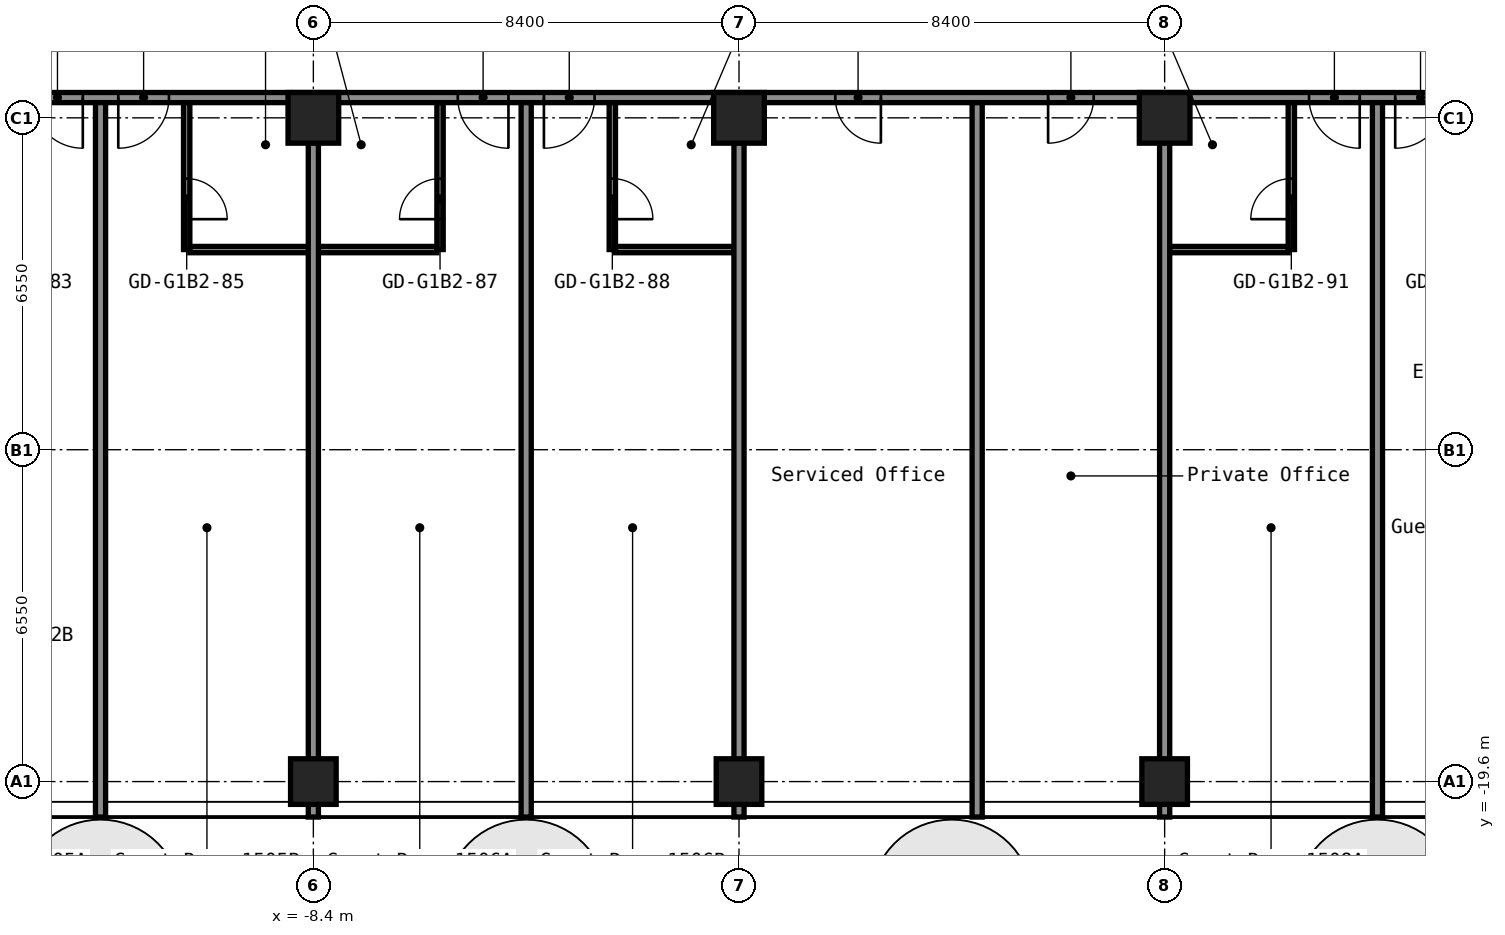
"""IFC4 building model, lengths in metres.
Left out: names, types, materials, properties, quantities, classifications, styles, units other than length and angle.
Written with IfcOpenShell. Run it as: python <this file> out.ifc"""

import sys

from ifc_helpers import new_model, si_unit, direction, frame, frame_2d, origin, origin_2d, place, context, subcontext, project, spatial, rectangle, hollow_rectangle, extrude, element, fill, save


model = new_model("IFC4")
c1 = context("Model", 3, precision=1e-05, world=origin(), true_north=direction((0.0, 1.0)))
c2 = subcontext(c1, "Body", "Model", "MODEL_VIEW")
j1 = project(units=[si_unit("LENGTHUNIT", "METRE"), si_unit("PLANEANGLEUNIT", "RADIAN")], contexts=[c1])
p1 = place(None, origin())
s1 = spatial("IfcSite", under=j1, at=p1, CompositionType="ELEMENT")
p2 = place(p1, origin())
s2 = spatial("IfcBuilding", under=s1, at=p2, CompositionType="ELEMENT")
p3 = place(p2, frame((0.0, 0.0, 55.0)))
s3 = spatial("IfcBuildingStorey", under=s2, at=p3, CompositionType="ELEMENT", Elevation=55.0)
p4 = place(p3, frame((-8.4, -19.6, 0.0), z_axis=(0.0, 0.0, 1.0), x_axis=(1.0, 0.0, 0.0)))
e1 = element("IfcColumn", 1, at=p4, inside=s3, PredefinedType="COLUMN", context=c2, shape_type="SweptSolid", body=[
    extrude(hollow_rectangle(XDim=0.9, YDim=0.9, WallThickness=0.036, at=origin_2d()), origin(), (0.0, 0.0, 1.0), 2.8),
])
p5 = place(p3, frame((-8.4, -6.5, 0.0), z_axis=(0.0, 0.0, 1.0), x_axis=(1.0, 0.0, 0.0)))
e2 = element("IfcColumn", 2, at=p5, inside=s3, PredefinedType="COLUMN", context=c2, shape_type="SweptSolid", body=[
    extrude(hollow_rectangle(XDim=1.0, YDim=1.0, WallThickness=0.04, at=origin_2d()), origin(), (0.0, 0.0, 1.0), 2.8),
])
p6 = place(p3, frame((0.0, -19.6, 0.0), z_axis=(0.0, 0.0, 1.0), x_axis=(1.0, 0.0, 0.0)))
e3 = element("IfcColumn", 3, at=p6, inside=s3, PredefinedType="COLUMN", context=c2, shape_type="SweptSolid", body=[
    extrude(hollow_rectangle(XDim=0.9, YDim=0.9, WallThickness=0.036, at=origin_2d()), origin(), (0.0, 0.0, 1.0), 2.8),
])
p7 = place(p3, frame((0.0, -6.5, 0.0), z_axis=(0.0, 0.0, 1.0), x_axis=(1.0, 0.0, 0.0)))
e4 = element("IfcColumn", 4, at=p7, inside=s3, PredefinedType="COLUMN", context=c2, shape_type="SweptSolid", body=[
    extrude(hollow_rectangle(XDim=1.0, YDim=1.0, WallThickness=0.04, at=origin_2d()), origin(), (0.0, 0.0, 1.0), 2.8),
])
p8 = place(p3, frame((8.4, -19.6, 0.0), z_axis=(0.0, 0.0, 1.0), x_axis=(1.0, 0.0, 0.0)))
e5 = element("IfcColumn", 5, at=p8, inside=s3, PredefinedType="COLUMN", context=c2, shape_type="SweptSolid", body=[
    extrude(hollow_rectangle(XDim=0.9, YDim=0.9, WallThickness=0.036, at=origin_2d()), origin(), (0.0, 0.0, 1.0), 2.8),
])
p9 = place(p3, frame((8.4, -6.5, 0.0), z_axis=(0.0, 0.0, 1.0), x_axis=(1.0, 0.0, 0.0)))
e6 = element("IfcColumn", 6, at=p9, inside=s3, PredefinedType="COLUMN", context=c2, shape_type="SweptSolid", body=[
    extrude(hollow_rectangle(XDim=1.0, YDim=1.0, WallThickness=0.04, at=origin_2d()), origin(), (0.0, 0.0, 1.0), 2.8),
])
p10 = place(p3, frame((-10.837, -9.1, 0.0), z_axis=(0.0, 0.0, 1.0), x_axis=(1.0, 0.0, 0.0)))
e7 = element("IfcWall", 7, at=p10, inside=s3, PredefinedType="PARTITIONING", context=c2, shape_type="SweptSolid", body=[
    extrude(rectangle(XDim=4.875, YDim=0.125, at=frame_2d((2.438, 0.0))), origin(), (0.0, 0.0, 1.0), 2.8),
])
for number, where, z_axis, x_axis in (
    (8, (-2.438, -9.1, 0.0), (0.0, 0.0, 1.0), (1.0, 0.0, 0.0)),
    (9, (8.5, -9.1, 0.0), (0.0, 0.0, 1.0), (1.0, 0.0, 0.0)),
):
    element("IfcWall", number, at=place(p3, frame(where, z_axis=z_axis, x_axis=x_axis)), inside=s3, PredefinedType="PARTITIONING", context=c2, shape_type="SweptSolid", body=[
        extrude(rectangle(XDim=2.337, YDim=0.125, at=frame_2d((1.169, 0.0))), origin(), (0.0, 0.0, 1.0), 2.8),
    ])
p11 = place(p3, frame((-16.8, -6.1, 0.0), z_axis=(0.0, 0.0, 1.0), x_axis=(1.0, 0.0, 0.0)))
e10 = element("IfcWall", 10, at=p11, inside=s3, PredefinedType="PARTITIONING", context=c2, shape_type="SweptSolid", body=[
    extrude(rectangle(XDim=33.6, YDim=0.2, at=frame_2d((16.8, 0.0))), origin(), (0.0, 0.0, 1.0), 2.8),
])
p12 = place(p11, frame((2.85, 0.0, 0.0)))
e11 = element("IfcOpeningElement", 11, at=p12, cuts=e10, PredefinedType="OPENING", context=c2, shape_type="SweptSolid", body=[
    extrude(rectangle(XDim=1.0, YDim=2.1, at=frame_2d((0.5, 1.05))), frame((0.0, 0.11, 0.0), z_axis=(0.0, -1.0, 0.0), x_axis=(1.0, 0.0, 0.0)), (0.0, 0.0, 1.0), 0.22),
])
p13 = place(p11, frame((4.55, 0.0, 0.0)))
e12 = element("IfcOpeningElement", 12, at=p13, cuts=e10, PredefinedType="OPENING", context=c2, shape_type="SweptSolid", body=[
    extrude(rectangle(XDim=1.0, YDim=2.1, at=frame_2d((0.5, 1.05))), frame((0.0, 0.11, 0.0), z_axis=(0.0, -1.0, 0.0), x_axis=(1.0, 0.0, 0.0)), (0.0, 0.0, 1.0), 0.22),
])
p14 = place(p11, frame((11.25, 0.0, 0.0)))
e13 = element("IfcOpeningElement", 13, at=p14, cuts=e10, PredefinedType="OPENING", context=c2, shape_type="SweptSolid", body=[
    extrude(rectangle(XDim=1.0, YDim=2.1, at=frame_2d((0.5, 1.05))), frame((0.0, 0.11, 0.0), z_axis=(0.0, -1.0, 0.0), x_axis=(1.0, 0.0, 0.0)), (0.0, 0.0, 1.0), 0.22),
])
p15 = place(p11, frame((12.95, 0.0, 0.0)))
e14 = element("IfcOpeningElement", 14, at=p15, cuts=e10, PredefinedType="OPENING", context=c2, shape_type="SweptSolid", body=[
    extrude(rectangle(XDim=1.0, YDim=2.1, at=frame_2d((0.5, 1.05))), frame((0.0, 0.11, 0.0), z_axis=(0.0, -1.0, 0.0), x_axis=(1.0, 0.0, 0.0)), (0.0, 0.0, 1.0), 0.22),
])
p16 = place(p11, frame((18.7, 0.0, 0.0)))
e15 = element("IfcOpeningElement", 15, at=p16, cuts=e10, PredefinedType="OPENING", context=c2, shape_type="SweptSolid", body=[
    extrude(rectangle(XDim=0.9, YDim=2.1, at=frame_2d((0.45, 1.05))), frame((0.0, 0.11, 0.0), z_axis=(0.0, -1.0, 0.0), x_axis=(1.0, 0.0, 0.0)), (0.0, 0.0, 1.0), 0.22),
])
p17 = place(p11, frame((22.9, 0.0, 0.0)))
e16 = element("IfcOpeningElement", 16, at=p17, cuts=e10, PredefinedType="OPENING", context=c2, shape_type="SweptSolid", body=[
    extrude(rectangle(XDim=0.9, YDim=2.1, at=frame_2d((0.45, 1.05))), frame((0.0, 0.11, 0.0), z_axis=(0.0, -1.0, 0.0), x_axis=(1.0, 0.0, 0.0)), (0.0, 0.0, 1.0), 0.22),
])
p18 = place(p11, frame((28.05, 0.0, 0.0)))
e17 = element("IfcOpeningElement", 17, at=p18, cuts=e10, PredefinedType="OPENING", context=c2, shape_type="SweptSolid", body=[
    extrude(rectangle(XDim=1.0, YDim=2.1, at=frame_2d((0.5, 1.05))), frame((0.0, 0.11, 0.0), z_axis=(0.0, -1.0, 0.0), x_axis=(1.0, 0.0, 0.0)), (0.0, 0.0, 1.0), 0.22),
])
p19 = place(p11, frame((29.75, 0.0, 0.0)))
e18 = element("IfcOpeningElement", 18, at=p19, cuts=e10, PredefinedType="OPENING", context=c2, shape_type="SweptSolid", body=[
    extrude(rectangle(XDim=1.0, YDim=2.1, at=frame_2d((0.5, 1.05))), frame((0.0, 0.11, 0.0), z_axis=(0.0, -1.0, 0.0), x_axis=(1.0, 0.0, 0.0)), (0.0, 0.0, 1.0), 0.22),
])
p20 = place(p3, frame((-12.6, -20.3, 0.0), z_axis=(0.0, 0.0, 1.0), x_axis=(0.0, 1.0, 0.0)))
e19 = element("IfcWall", 19, at=p20, inside=s3, PredefinedType="PARTITIONING", context=c2, shape_type="SweptSolid", body=[
    extrude(rectangle(XDim=14.1, YDim=0.2, at=frame_2d((7.05, 0.0))), origin(), (0.0, 0.0, 1.0), 2.8),
])
p21 = place(p3, frame((-10.9, -9.1, 0.0), z_axis=(0.0, 0.0, 1.0), x_axis=(0.0, 1.0, 0.0)))
e20 = element("IfcWall", 20, at=p21, inside=s3, PredefinedType="PARTITIONING", context=c2, shape_type="SweptSolid", body=[
    extrude(rectangle(XDim=2.9, YDim=0.125, at=frame_2d((1.45, 0.0))), origin(), (0.0, 0.0, 1.0), 2.8),
])
p22 = place(p21, frame((0.6, 0.0, 0.0)))
e21 = element("IfcOpeningElement", 21, at=p22, cuts=e20, PredefinedType="OPENING", context=c2, shape_type="SweptSolid", body=[
    extrude(rectangle(XDim=0.8, YDim=2.1, at=frame_2d((0.4, 1.05))), frame((0.0, 0.073, 0.0), z_axis=(0.0, -1.0, 0.0), x_axis=(1.0, 0.0, 0.0)), (0.0, 0.0, 1.0), 0.145),
])
p23 = place(p3, frame((-8.4, -20.3, 0.0), z_axis=(0.0, 0.0, 1.0), x_axis=(0.0, 1.0, 0.0)))
e22 = element("IfcWall", 22, at=p23, inside=s3, PredefinedType="PARTITIONING", context=c2, shape_type="SweptSolid", body=[
    extrude(rectangle(XDim=13.31, YDim=0.2, at=frame_2d((6.655, 0.0))), origin(), (0.0, 0.0, 1.0), 2.8),
])
p24 = place(p3, frame((-5.9, -9.1, 0.0), z_axis=(0.0, 0.0, 1.0), x_axis=(0.0, 1.0, 0.0)))
e23 = element("IfcWall", 23, at=p24, inside=s3, PredefinedType="PARTITIONING", context=c2, shape_type="SweptSolid", body=[
    extrude(rectangle(XDim=2.9, YDim=0.125, at=frame_2d((1.45, 0.0))), origin(), (0.0, 0.0, 1.0), 2.8),
])
p25 = place(p24, frame((0.6, 0.0, 0.0)))
e24 = element("IfcOpeningElement", 24, at=p25, cuts=e23, PredefinedType="OPENING", context=c2, shape_type="SweptSolid", body=[
    extrude(rectangle(XDim=0.8, YDim=2.1, at=frame_2d((0.4, 1.05))), frame((0.0, 0.073, 0.0), z_axis=(0.0, -1.0, 0.0), x_axis=(1.0, 0.0, 0.0)), (0.0, 0.0, 1.0), 0.145),
])
p26 = place(p3, frame((-4.2, -20.3, 0.0), z_axis=(0.0, 0.0, 1.0), x_axis=(0.0, 1.0, 0.0)))
e25 = element("IfcWall", 25, at=p26, inside=s3, PredefinedType="PARTITIONING", context=c2, shape_type="SweptSolid", body=[
    extrude(rectangle(XDim=14.1, YDim=0.2, at=frame_2d((7.05, 0.0))), origin(), (0.0, 0.0, 1.0), 2.8),
])
p27 = place(p3, frame((-2.5, -9.1, 0.0), z_axis=(0.0, 0.0, 1.0), x_axis=(0.0, 1.0, 0.0)))
e26 = element("IfcWall", 26, at=p27, inside=s3, PredefinedType="PARTITIONING", context=c2, shape_type="SweptSolid", body=[
    extrude(rectangle(XDim=2.9, YDim=0.125, at=frame_2d((1.45, 0.0))), origin(), (0.0, 0.0, 1.0), 2.8),
])
p28 = place(p27, frame((0.6, 0.0, 0.0)))
e27 = element("IfcOpeningElement", 27, at=p28, cuts=e26, PredefinedType="OPENING", context=c2, shape_type="SweptSolid", body=[
    extrude(rectangle(XDim=0.8, YDim=2.1, at=frame_2d((0.4, 1.05))), frame((0.0, 0.073, 0.0), z_axis=(0.0, -1.0, 0.0), x_axis=(1.0, 0.0, 0.0)), (0.0, 0.0, 1.0), 0.145),
])
p29 = place(p3, frame((0.0, -20.3, 0.0), z_axis=(0.0, 0.0, 1.0), x_axis=(0.0, 1.0, 0.0)))
e28 = element("IfcWall", 28, at=p29, inside=s3, PredefinedType="PARTITIONING", context=c2, shape_type="SweptSolid", body=[
    extrude(rectangle(XDim=13.31, YDim=0.2, at=frame_2d((6.655, 0.0))), origin(), (0.0, 0.0, 1.0), 2.8),
])
p30 = place(p3, frame((4.7, -20.3, 0.0), z_axis=(0.0, 0.0, 1.0), x_axis=(0.0, 1.0, 0.0)))
e29 = element("IfcWall", 29, at=p30, inside=s3, PredefinedType="PARTITIONING", context=c2, shape_type="SweptSolid", body=[
    extrude(rectangle(XDim=14.1, YDim=0.2, at=frame_2d((7.05, 0.0))), origin(), (0.0, 0.0, 1.0), 2.8),
])
p31 = place(p3, frame((8.4, -20.3, 0.0), z_axis=(0.0, 0.0, 1.0), x_axis=(0.0, 1.0, 0.0)))
e30 = element("IfcWall", 30, at=p31, inside=s3, PredefinedType="PARTITIONING", context=c2, shape_type="SweptSolid", body=[
    extrude(rectangle(XDim=13.31, YDim=0.2, at=frame_2d((6.655, 0.0))), origin(), (0.0, 0.0, 1.0), 2.8),
])
p32 = place(p3, frame((10.9, -9.1, 0.0), z_axis=(0.0, 0.0, 1.0), x_axis=(0.0, 1.0, 0.0)))
e31 = element("IfcWall", 31, at=p32, inside=s3, PredefinedType="PARTITIONING", context=c2, shape_type="SweptSolid", body=[
    extrude(rectangle(XDim=2.9, YDim=0.125, at=frame_2d((1.45, 0.0))), origin(), (0.0, 0.0, 1.0), 2.8),
])
p33 = place(p32, frame((0.6, 0.0, 0.0)))
e32 = element("IfcOpeningElement", 32, at=p33, cuts=e31, PredefinedType="OPENING", context=c2, shape_type="SweptSolid", body=[
    extrude(rectangle(XDim=0.8, YDim=2.1, at=frame_2d((0.4, 1.05))), frame((0.0, 0.073, 0.0), z_axis=(0.0, -1.0, 0.0), x_axis=(1.0, 0.0, 0.0)), (0.0, 0.0, 1.0), 0.145),
])
p34 = place(p3, frame((12.6, -20.3, 0.0), z_axis=(0.0, 0.0, 1.0), x_axis=(0.0, 1.0, 0.0)))
e33 = element("IfcWall", 33, at=p34, inside=s3, PredefinedType="PARTITIONING", context=c2, shape_type="SweptSolid", body=[
    extrude(rectangle(XDim=14.1, YDim=0.2, at=frame_2d((7.05, 0.0))), origin(), (0.0, 0.0, 1.0), 2.8),
])
p35 = place(p12, origin())
e34 = element("IfcDoor", 34, at=p35, inside=s3, OperationType="SINGLE_SWING_RIGHT", PredefinedType="DOOR", context=c2, shape_type="SweptSolid", body=[
    extrude(rectangle(XDim=1.0, YDim=2.1, at=frame_2d((0.5, 1.05))), frame((0.0, 0.025, 0.0), z_axis=(0.0, -1.0, 0.0), x_axis=(1.0, 0.0, 0.0)), (0.0, 0.0, 1.0), 0.05),
])
fill(e11, e34)
p36 = place(p13, origin())
e35 = element("IfcDoor", 35, at=p36, inside=s3, OperationType="SINGLE_SWING_LEFT", PredefinedType="DOOR", context=c2, shape_type="SweptSolid", body=[
    extrude(rectangle(XDim=1.0, YDim=2.1, at=frame_2d((0.5, 1.05))), frame((0.0, 0.025, 0.0), z_axis=(0.0, -1.0, 0.0), x_axis=(1.0, 0.0, 0.0)), (0.0, 0.0, 1.0), 0.05),
])
fill(e12, e35)
p37 = place(p14, origin())
e36 = element("IfcDoor", 36, at=p37, inside=s3, OperationType="SINGLE_SWING_RIGHT", PredefinedType="DOOR", context=c2, shape_type="SweptSolid", body=[
    extrude(rectangle(XDim=1.0, YDim=2.1, at=frame_2d((0.5, 1.05))), frame((0.0, 0.025, 0.0), z_axis=(0.0, -1.0, 0.0), x_axis=(1.0, 0.0, 0.0)), (0.0, 0.0, 1.0), 0.05),
])
fill(e13, e36)
p38 = place(p15, origin())
e37 = element("IfcDoor", 37, at=p38, inside=s3, OperationType="SINGLE_SWING_LEFT", PredefinedType="DOOR", context=c2, shape_type="SweptSolid", body=[
    extrude(rectangle(XDim=1.0, YDim=2.1, at=frame_2d((0.5, 1.05))), frame((0.0, 0.025, 0.0), z_axis=(0.0, -1.0, 0.0), x_axis=(1.0, 0.0, 0.0)), (0.0, 0.0, 1.0), 0.05),
])
fill(e14, e37)
p39 = place(p16, origin())
e38 = element("IfcDoor", 38, at=p39, inside=s3, OperationType="SINGLE_SWING_RIGHT", PredefinedType="DOOR", context=c2, shape_type="SweptSolid", body=[
    extrude(rectangle(XDim=0.9, YDim=2.1, at=frame_2d((0.45, 1.05))), frame((0.0, 0.025, 0.0), z_axis=(0.0, -1.0, 0.0), x_axis=(1.0, 0.0, 0.0)), (0.0, 0.0, 1.0), 0.05),
])
fill(e15, e38)
p40 = place(p17, origin())
e39 = element("IfcDoor", 39, at=p40, inside=s3, OperationType="SINGLE_SWING_LEFT", PredefinedType="DOOR", context=c2, shape_type="SweptSolid", body=[
    extrude(rectangle(XDim=0.9, YDim=2.1, at=frame_2d((0.45, 1.05))), frame((0.0, 0.025, 0.0), z_axis=(0.0, -1.0, 0.0), x_axis=(1.0, 0.0, 0.0)), (0.0, 0.0, 1.0), 0.05),
])
fill(e16, e39)
p41 = place(p18, origin())
e40 = element("IfcDoor", 40, at=p41, inside=s3, OperationType="SINGLE_SWING_RIGHT", PredefinedType="DOOR", context=c2, shape_type="SweptSolid", body=[
    extrude(rectangle(XDim=1.0, YDim=2.1, at=frame_2d((0.5, 1.05))), frame((0.0, 0.025, 0.0), z_axis=(0.0, -1.0, 0.0), x_axis=(1.0, 0.0, 0.0)), (0.0, 0.0, 1.0), 0.05),
])
fill(e17, e40)
p42 = place(p19, origin())
e41 = element("IfcDoor", 41, at=p42, inside=s3, OperationType="SINGLE_SWING_LEFT", PredefinedType="DOOR", context=c2, shape_type="SweptSolid", body=[
    extrude(rectangle(XDim=1.0, YDim=2.1, at=frame_2d((0.5, 1.05))), frame((0.0, 0.025, 0.0), z_axis=(0.0, -1.0, 0.0), x_axis=(1.0, 0.0, 0.0)), (0.0, 0.0, 1.0), 0.05),
])
fill(e18, e41)
p43 = place(p22, origin())
e42 = element("IfcDoor", 42, at=p43, inside=s3, OperationType="SINGLE_SWING_LEFT", PredefinedType="DOOR", context=c2, shape_type="SweptSolid", body=[
    extrude(rectangle(XDim=0.8, YDim=2.1, at=frame_2d((0.4, 1.05))), frame((0.0, 0.025, 0.0), z_axis=(0.0, -1.0, 0.0), x_axis=(1.0, 0.0, 0.0)), (0.0, 0.0, 1.0), 0.05),
])
fill(e21, e42)
p44 = place(p25, origin())
e43 = element("IfcDoor", 43, at=p44, inside=s3, OperationType="SINGLE_SWING_RIGHT", PredefinedType="DOOR", context=c2, shape_type="SweptSolid", body=[
    extrude(rectangle(XDim=0.8, YDim=2.1, at=frame_2d((0.4, 1.05))), frame((0.0, 0.025, 0.0), z_axis=(0.0, -1.0, 0.0), x_axis=(1.0, 0.0, 0.0)), (0.0, 0.0, 1.0), 0.05),
])
fill(e24, e43)
p45 = place(p28, origin())
e44 = element("IfcDoor", 44, at=p45, inside=s3, OperationType="SINGLE_SWING_LEFT", PredefinedType="DOOR", context=c2, shape_type="SweptSolid", body=[
    extrude(rectangle(XDim=0.8, YDim=2.1, at=frame_2d((0.4, 1.05))), frame((0.0, 0.025, 0.0), z_axis=(0.0, -1.0, 0.0), x_axis=(1.0, 0.0, 0.0)), (0.0, 0.0, 1.0), 0.05),
])
fill(e27, e44)
p46 = place(p33, origin())
e45 = element("IfcDoor", 45, at=p46, inside=s3, OperationType="SINGLE_SWING_RIGHT", PredefinedType="DOOR", context=c2, shape_type="SweptSolid", body=[
    extrude(rectangle(XDim=0.8, YDim=2.1, at=frame_2d((0.4, 1.05))), frame((0.0, 0.025, 0.0), z_axis=(0.0, -1.0, 0.0), x_axis=(1.0, 0.0, 0.0)), (0.0, 0.0, 1.0), 0.05),
])
fill(e32, e45)
save(model, sys.argv[1])
